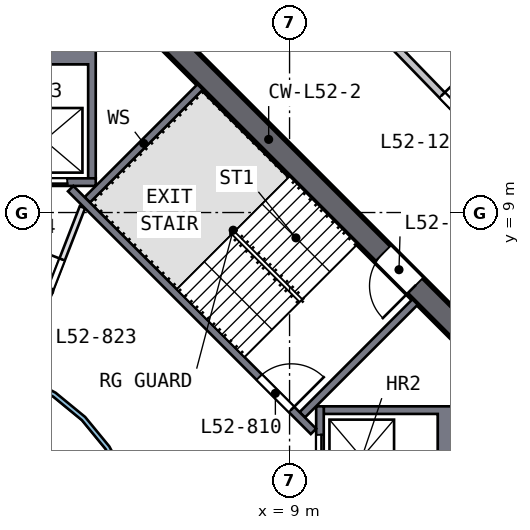
"""IFC4 building model, lengths in metres.
Left out: names, types, materials, properties, quantities, classifications, styles, units other than length and angle.
Written with IfcOpenShell. Run it as: python <this file> out.ifc"""

import sys

from ifc_helpers import new_model, si_unit, direction, frame, frame_2d, origin, place, context, subcontext, project, spatial, polyline, rectangle, outline, extrude, element, fill, save


model = new_model("IFC4")
c1 = context("Model", 3, precision=1e-05, world=origin(), true_north=direction((0.0, 1.0)))
c2 = subcontext(c1, "Body", "Model", "MODEL_VIEW")
j1 = project(units=[si_unit("LENGTHUNIT", "METRE"), si_unit("PLANEANGLEUNIT", "RADIAN")], contexts=[c1])
p1 = place(None, origin())
s1 = spatial("IfcSite", under=j1, at=p1, CompositionType="ELEMENT")
p2 = place(p1, origin())
s2 = spatial("IfcBuilding", under=s1, at=p2, CompositionType="ELEMENT")
p3 = place(p2, frame((0.0, 0.0, 212.5)))
s3 = spatial("IfcBuildingStorey", under=s2, at=p3, CompositionType="ELEMENT", Elevation=212.5)
p4 = place(p3, frame((13.788, 5.587, 0.0), z_axis=(0.0, 0.0, 1.0), x_axis=(-0.707106781, 0.707106781, 0.0)))
e1 = element("IfcWall", 1, at=p4, inside=s3, PredefinedType="SHEAR", context=c2, shape_type="SweptSolid", body=[
    extrude(rectangle(XDim=11.598, YDim=0.6, at=frame_2d((5.799, 0.0))), origin(), (0.0, 0.0, 1.0), 3.5),
])
p5 = place(p4, frame((2.099, 0.0, 0.0)))
e2 = element("IfcOpeningElement", 2, at=p5, cuts=e1, PredefinedType="OPENING", context=c2, shape_type="SweptSolid", body=[
    extrude(rectangle(XDim=1.2, YDim=2.1, at=frame_2d((0.6, 1.05))), frame((0.0, 0.31, 0.0), z_axis=(0.0, -1.0, 0.0), x_axis=(1.0, 0.0, 0.0)), (0.0, 0.0, 1.0), 0.62),
])
p6 = place(p3, origin())
e3 = element("IfcWall", 3, at=p6, inside=s3, PredefinedType="SOLIDWALL", context=c2, shape_type="SweptSolid", body=[
    extrude(outline(polyline([(13.4, 3.9), (13.4, 1.2), (9.9, 1.2), (9.9, 1.4), (12.9, 1.4), (12.9, 3.7), (9.9, 3.7), (9.9, 3.9), (13.4, 3.9)])), origin(), (0.0, 0.0, 1.0), 3.0),
])
p7 = place(p3, frame((9.8, 1.2, 0.0), z_axis=(0.0, 0.0, 1.0), x_axis=(0.0, 1.0, 0.0)))
e4 = element("IfcWall", 4, at=p7, inside=s3, PredefinedType="SOLIDWALL", context=c2, shape_type="SweptSolid", body=[
    extrude(rectangle(XDim=2.7, YDim=0.2, at=frame_2d((1.35, 0.0))), origin(), (0.0, 0.0, 1.0), 3.0),
])
p8 = place(p7, frame((0.75, 0.0, 0.0)))
e5 = element("IfcOpeningElement", 5, at=p8, cuts=e4, PredefinedType="OPENING", context=c2, shape_type="SweptSolid", body=[
    extrude(rectangle(XDim=1.2, YDim=2.1, at=frame_2d((0.6, 1.05))), frame((0.0, 0.11, 0.0), z_axis=(0.0, -1.0, 0.0), x_axis=(1.0, 0.0, 0.0)), (0.0, 0.0, 1.0), 0.22),
])
p9 = place(p3, origin())
e6 = element("IfcWall", 6, at=p9, inside=s3, PredefinedType="SOLIDWALL", context=c2, shape_type="SweptSolid", body=[
    extrude(outline(polyline([(3.9, 9.9), (3.7, 9.9), (3.7, 12.9), (1.4, 12.9), (1.4, 9.9), (1.2, 9.9), (1.2, 13.4), (3.9, 13.4), (3.9, 9.9)])), origin(), (0.0, 0.0, 1.0), 3.0),
])
p10 = place(p3, frame((1.2, 9.8, 0.0), z_axis=(0.0, 0.0, 1.0), x_axis=(1.0, 0.0, 0.0)))
e7 = element("IfcWall", 7, at=p10, inside=s3, PredefinedType="SOLIDWALL", context=c2, shape_type="SweptSolid", body=[
    extrude(rectangle(XDim=2.7, YDim=0.2, at=frame_2d((1.35, 0.0))), origin(), (0.0, 0.0, 1.0), 3.0),
])
p11 = place(p10, frame((0.75, 0.0, 0.0)))
e8 = element("IfcOpeningElement", 8, at=p11, cuts=e7, PredefinedType="OPENING", context=c2, shape_type="SweptSolid", body=[
    extrude(rectangle(XDim=1.2, YDim=2.1, at=frame_2d((0.6, 1.05))), frame((0.0, 0.11, 0.0), z_axis=(0.0, -1.0, 0.0), x_axis=(1.0, 0.0, 0.0)), (0.0, 0.0, 1.0), 0.22),
])
p12 = place(p3, frame((3.24, 9.629, 0.0), z_axis=(0.0, 0.0, 1.0), x_axis=(0.707106781, -0.707106781, 0.0)))
e9 = element("IfcWall", 9, at=p12, inside=s3, PredefinedType="SOLIDWALL", context=c2, shape_type="SweptSolid", body=[
    extrude(rectangle(XDim=9.036, YDim=0.2, at=frame_2d((4.518, 0.0))), origin(), (0.0, 0.0, 1.0), 3.0),
])
p13 = place(p12, frame((7.018, 0.0, 0.0)))
e10 = element("IfcOpeningElement", 10, at=p13, cuts=e9, PredefinedType="OPENING", context=c2, shape_type="SweptSolid", body=[
    extrude(rectangle(XDim=1.2, YDim=2.1, at=frame_2d((0.6, 1.05))), frame((0.0, 0.11, 0.0), z_axis=(0.0, -1.0, 0.0), x_axis=(1.0, 0.0, 0.0)), (0.0, 0.0, 1.0), 0.22),
])
for number, where, z_axis, x_axis in (
    (11, (9.334, 3.677, 0.0), (0.0, 0.0, 1.0), (0.707, 0.707, 0.0)),
    (12, (3.677, 9.334, 0.0), (0.0, 0.0, 1.0), (0.707, 0.707, 0.0)),
):
    element("IfcWall", number, at=place(p3, frame(where, z_axis=z_axis, x_axis=x_axis)), inside=s3, PredefinedType="SOLIDWALL", context=c2, shape_type="SweptSolid", body=[
        extrude(rectangle(XDim=4.2, YDim=0.2, at=frame_2d((2.1, 0.0))), origin(), (0.0, 0.0, 1.0), 3.0),
    ])
p14 = place(p3, frame((1.857, 4.782, 0.0), z_axis=(0.0, 0.0, 1.0), x_axis=(0.362053096, 0.932157474, 0.0)))
e13 = element("IfcWall", 13, at=p14, inside=s3, PredefinedType="PARTITIONING", context=c2, shape_type="SweptSolid", body=[
    extrude(rectangle(XDim=4.675, YDim=0.15, at=frame_2d((2.337, 0.0))), origin(), (0.0, 0.0, 1.0), 3.0),
])
p15 = place(p14, frame((1.4, 0.0, 0.0)))
e14 = element("IfcOpeningElement", 14, at=p15, cuts=e13, PredefinedType="OPENING", context=c2, shape_type="SweptSolid", body=[
    extrude(rectangle(XDim=1.8, YDim=2.1, at=frame_2d((0.9, 1.05))), frame((0.0, 0.085, 0.0), z_axis=(0.0, -1.0, 0.0), x_axis=(1.0, 0.0, 0.0)), (0.0, 0.0, 1.0), 0.17),
])
p16 = place(p3, origin())
e15 = element("IfcWall", 15, at=p16, inside=s3, PredefinedType="SOLIDWALL", context=c2, shape_type="SweptSolid", body=[
    extrude(outline(polyline([(5.021, -0.999), (4.73, -1.959), (4.257, -2.844), (3.62, -3.62), (2.844, -4.257), (1.959, -4.73), (0.999, -5.021), (0.0, -5.12), (-0.999, -5.021), (-1.959, -4.73), (-2.844, -4.257), (-3.62, -3.62), (-4.257, -2.844), (-4.73, -1.959), (-5.021, -0.999), (-5.12, 0.0), (-5.021, 0.999), (-4.73, 1.959), (-4.257, 2.844), (-3.62, 3.62), (-2.844, 4.257), (-1.959, 4.73), (-0.999, 5.021), (0.0, 5.12), (0.999, 5.021), (1.959, 4.73), (2.844, 4.257), (3.62, 3.62), (4.257, 2.844), (4.73, 1.959), (5.021, 0.999), (5.12, 0.0), (5.021, -0.999)]), holes=[polyline([(4.904, 0.976), (4.619, 1.913), (4.157, 2.778), (3.535, 3.535), (2.778, 4.157), (1.913, 4.619), (0.976, 4.904), (0.0, 5.0), (-0.976, 4.904), (-1.913, 4.619), (-2.778, 4.157), (-3.535, 3.535), (-4.157, 2.778), (-4.619, 1.913), (-4.904, 0.976), (-5.0, 0.0), (-4.904, -0.976), (-4.619, -1.913), (-4.157, -2.778), (-3.535, -3.535), (-2.778, -4.157), (-1.913, -4.619), (-0.976, -4.904), (0.0, -5.0), (0.976, -4.904), (1.913, -4.619), (2.778, -4.157), (3.535, -3.535), (4.157, -2.778), (4.619, -1.913), (4.904, -0.976), (5.0, 0.0), (4.904, 0.976)])]), origin(), (0.0, 0.0, 1.0), 3.0),
])
p17 = place(p3, frame((9.425, 15.785, 0.0), z_axis=(0.0, 0.0, 1.0), x_axis=(0.696666645, -0.717395, 0.0)))
e16 = element("IfcWall", 16, at=p17, inside=s3, PredefinedType="SOLIDWALL", context=c2, shape_type="SweptSolid", body=[
    extrude(rectangle(XDim=9.316, YDim=0.2, at=frame_2d((4.658, 0.0))), origin(), (0.0, 0.0, 1.0), 3.0),
])
p18 = place(p17, frame((5.15, 0.0, 0.0)))
e17 = element("IfcOpeningElement", 17, at=p18, cuts=e16, PredefinedType="OPENING", context=c2, shape_type="SweptSolid", body=[
    extrude(rectangle(XDim=1.0, YDim=2.1, at=frame_2d((0.5, 1.05))), frame((0.0, 0.11, 0.0), z_axis=(0.0, -1.0, 0.0), x_axis=(1.0, 0.0, 0.0)), (0.0, 0.0, 1.0), 0.22),
])
p19 = place(p8, origin())
e18 = element("IfcDoor", 18, at=p19, inside=s3, OperationType="DOUBLE_DOOR_SLIDING", PredefinedType="DOOR", context=c2, shape_type="SweptSolid", body=[
    extrude(rectangle(XDim=1.2, YDim=2.1, at=frame_2d((0.6, 1.05))), frame((0.0, 0.025, 0.0), z_axis=(0.0, -1.0, 0.0), x_axis=(1.0, 0.0, 0.0)), (0.0, 0.0, 1.0), 0.05),
])
fill(e5, e18)
p20 = place(p11, origin())
e19 = element("IfcDoor", 19, at=p20, inside=s3, OperationType="DOUBLE_DOOR_SLIDING", PredefinedType="DOOR", context=c2, shape_type="SweptSolid", body=[
    extrude(rectangle(XDim=1.2, YDim=2.1, at=frame_2d((0.6, 1.05))), frame((0.0, 0.025, 0.0), z_axis=(0.0, -1.0, 0.0), x_axis=(1.0, 0.0, 0.0)), (0.0, 0.0, 1.0), 0.05),
])
fill(e8, e19)
p21 = place(p13, origin())
e20 = element("IfcDoor", 20, at=p21, inside=s3, OperationType="SINGLE_SWING_RIGHT", PredefinedType="DOOR", context=c2, shape_type="SweptSolid", body=[
    extrude(rectangle(XDim=1.2, YDim=2.1, at=frame_2d((0.6, 1.05))), frame((0.0, 0.025, 0.0), z_axis=(0.0, -1.0, 0.0), x_axis=(1.0, 0.0, 0.0)), (0.0, 0.0, 1.0), 0.05),
])
fill(e10, e20)
p22 = place(p5, origin())
e21 = element("IfcDoor", 21, at=p22, inside=s3, OperationType="SINGLE_SWING_LEFT", PredefinedType="DOOR", context=c2, shape_type="SweptSolid", body=[
    extrude(rectangle(XDim=1.2, YDim=2.1, at=frame_2d((0.6, 1.05))), frame((0.0, 0.025, 0.0), z_axis=(0.0, -1.0, 0.0), x_axis=(1.0, 0.0, 0.0)), (0.0, 0.0, 1.0), 0.05),
])
fill(e2, e21)
p23 = place(p15, origin())
e22 = element("IfcDoor", 22, at=p23, inside=s3, OperationType="DOUBLE_DOOR_SINGLE_SWING", PredefinedType="DOOR", context=c2, shape_type="SweptSolid", body=[
    extrude(rectangle(XDim=1.8, YDim=2.1, at=frame_2d((0.9, 1.05))), frame((0.0, 0.025, 0.0), z_axis=(0.0, -1.0, 0.0), x_axis=(1.0, 0.0, 0.0)), (0.0, 0.0, 1.0), 0.05),
])
fill(e14, e22)
p24 = place(p18, origin())
e23 = element("IfcDoor", 23, at=p24, inside=s3, OperationType="SINGLE_SWING_LEFT", PredefinedType="DOOR", context=c2, shape_type="SweptSolid", body=[
    extrude(rectangle(XDim=1.0, YDim=2.1, at=frame_2d((0.5, 1.05))), frame((0.0, 0.025, 0.0), z_axis=(0.0, -1.0, 0.0), x_axis=(1.0, 0.0, 0.0)), (0.0, 0.0, 1.0), 0.05),
])
fill(e17, e23)
save(model, sys.argv[1])
